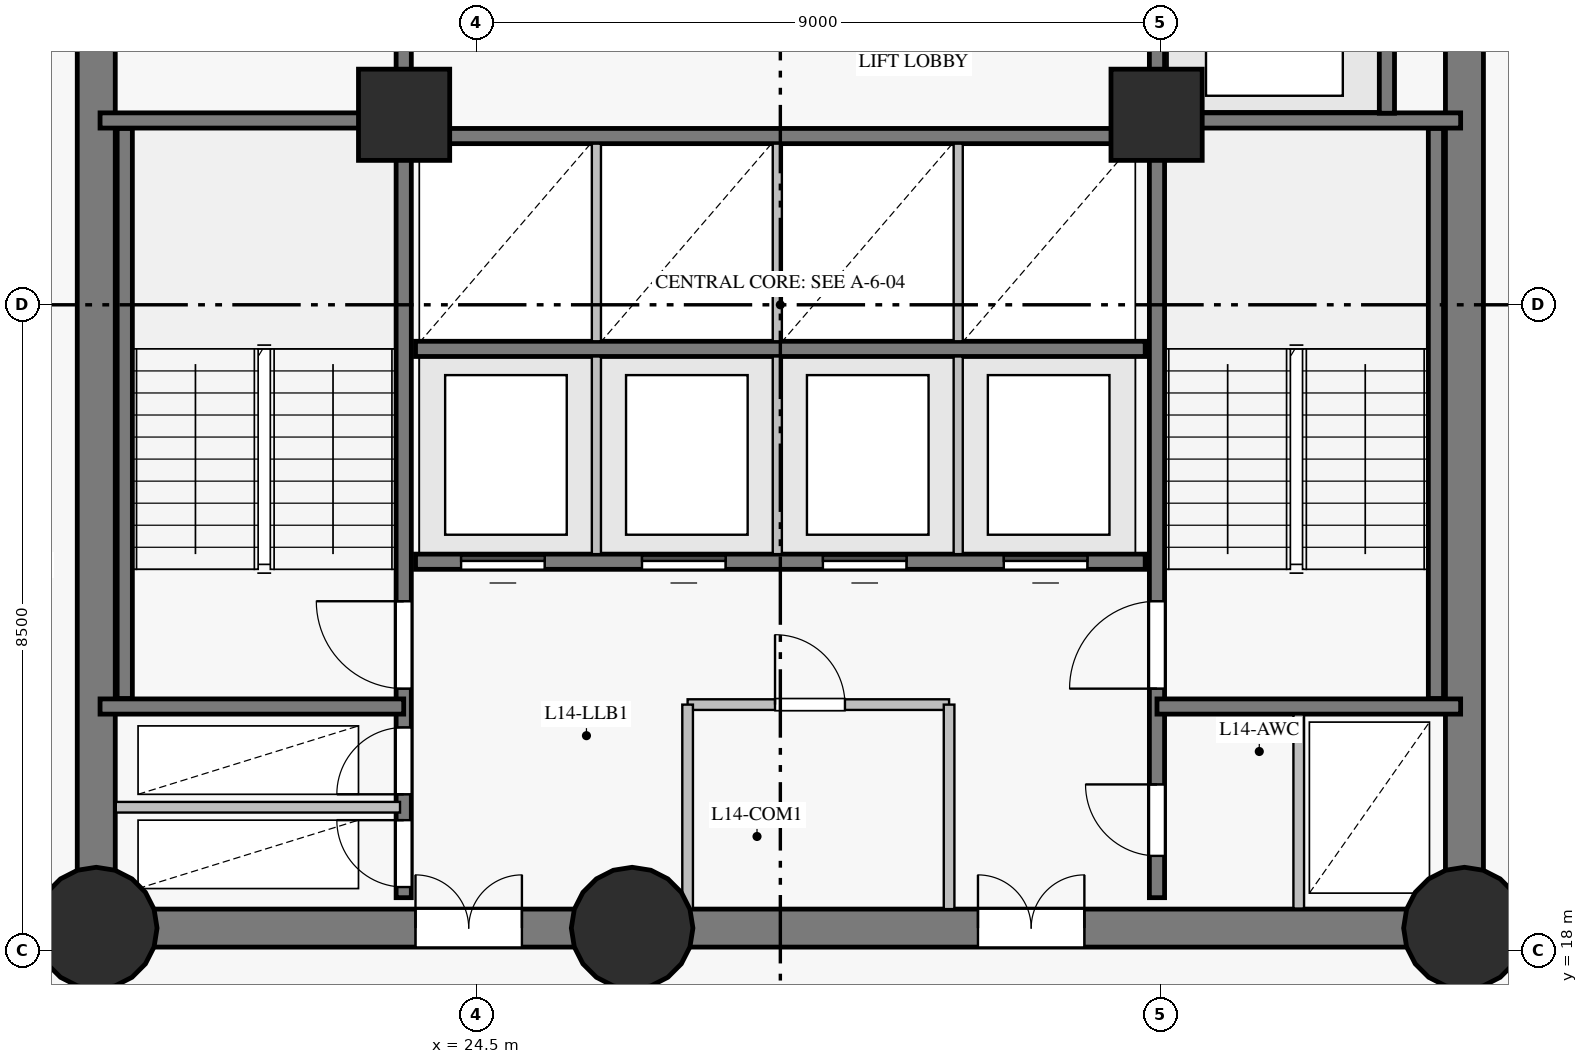
"""IFC4 building model, lengths in metres.
Left out: names, types, materials, properties, quantities, classifications, styles, units other than length and angle.
Written with IfcOpenShell. Run it as: python <this file> out.ifc"""

import sys

from ifc_helpers import new_model, si_unit, direction, frame, frame_2d, origin, origin_with_axes, origin_2d, place, context, subcontext, project, spatial, rectangle, circle, extrude, source, transform, mapped, element, fill, save


model = new_model("IFC4")
c1 = context("Model", 3, precision=1e-05, world=origin(), true_north=direction((0.0, 1.0)))
c2 = subcontext(c1, "Body", "Model", "MODEL_VIEW")
j1 = project(units=[si_unit("LENGTHUNIT", "METRE"), si_unit("PLANEANGLEUNIT", "RADIAN")], contexts=[c1])
p1 = place(None, origin())
s1 = spatial("IfcSite", under=j1, at=p1, CompositionType="ELEMENT")
p2 = place(p1, origin())
s2 = spatial("IfcBuilding", under=s1, at=p2, CompositionType="ELEMENT")
p3 = place(p2, frame((0.0, 0.0, 55.3)))
s3 = spatial("IfcBuildingStorey", under=s2, at=p3, CompositionType="ELEMENT", Elevation=55.3)
p4 = place(p3, frame((19.5, 18.3, 0.0), z_axis=(0.0, 0.0, 1.0), x_axis=(1.0, 0.0, 0.0)))
e1 = element("IfcWall", 1, at=p4, inside=s3, PredefinedType="SHEAR", context=c2, shape_type="SweptSolid", body=[
    extrude(rectangle(XDim=7.05, YDim=0.5, at=frame_2d((3.525, 0.0))), origin(), (0.0, 0.0, 1.0), 3.35),
])
p5 = place(p4, frame((4.2, 0.0, 0.0)))
e2 = element("IfcOpeningElement", 2, at=p5, cuts=e1, PredefinedType="OPENING", context=c2, shape_type="SweptSolid", body=[
    extrude(rectangle(XDim=1.4, YDim=2.2, at=frame_2d((0.7, 1.1))), frame((0.0, 0.26, 0.0), z_axis=(0.0, -1.0, 0.0), x_axis=(1.0, 0.0, 0.0)), (0.0, 0.0, 1.0), 0.52),
])
p6 = place(p3, frame((26.55, 18.3, 0.0), z_axis=(0.0, 0.0, 1.0), x_axis=(1.0, 0.0, 0.0)))
e3 = element("IfcWall", 3, at=p6, inside=s3, PredefinedType="SHEAR", context=c2, shape_type="SweptSolid", body=[
    extrude(rectangle(XDim=10.95, YDim=0.5, at=frame_2d((5.475, 0.0))), origin(), (0.0, 0.0, 1.0), 3.35),
])
p7 = place(p6, frame((4.55, 0.0, 0.0)))
e4 = element("IfcOpeningElement", 4, at=p7, cuts=e3, PredefinedType="OPENING", context=c2, shape_type="SweptSolid", body=[
    extrude(rectangle(XDim=1.4, YDim=2.2, at=frame_2d((0.7, 1.1))), frame((0.0, 0.26, 0.0), z_axis=(0.0, -1.0, 0.0), x_axis=(1.0, 0.0, 0.0)), (0.0, 0.0, 1.0), 0.52),
])
p8 = place(p3, frame((37.5, 18.3, 0.0), z_axis=(0.0, 0.0, 1.0), x_axis=(0.0, 1.0, 0.0)))
e5 = element("IfcWall", 5, at=p8, inside=s3, PredefinedType="SHEAR", context=c2, shape_type="SweptSolid", body=[
    extrude(rectangle(XDim=16.4, YDim=0.5, at=frame_2d((8.2, 0.0))), origin(), (0.0, 0.0, 1.0), 3.35),
])
p9 = place(p8, frame((14.06, 0.0, 0.0)))
e6 = element("IfcOpeningElement", 6, at=p9, cuts=e5, PredefinedType="OPENING", context=c2, shape_type="SweptSolid", body=[
    extrude(rectangle(XDim=1.2, YDim=2.15, at=frame_2d((0.6, 1.075))), frame((0.0, 0.26, 0.0), z_axis=(0.0, -1.0, 0.0), x_axis=(1.0, 0.0, 0.0)), (0.0, 0.0, 1.0), 0.52),
])
p10 = place(p3, frame((19.5, 34.7, 0.0), z_axis=(0.0, 0.0, 1.0), x_axis=(0.0, -1.0, 0.0)))
e7 = element("IfcWall", 7, at=p10, inside=s3, PredefinedType="SHEAR", context=c2, shape_type="SweptSolid", body=[
    extrude(rectangle(XDim=16.4, YDim=0.5, at=frame_2d((8.2, 0.0))), origin(), (0.0, 0.0, 1.0), 3.35),
])
p11 = place(p10, frame((3.1, 0.0, 0.0)))
e8 = element("IfcOpeningElement", 8, at=p11, cuts=e7, PredefinedType="OPENING", context=c2, shape_type="SweptSolid", body=[
    extrude(rectangle(XDim=1.1, YDim=2.15, at=frame_2d((0.55, 1.075))), frame((0.0, 0.26, 0.0), z_axis=(0.0, -1.0, 0.0), x_axis=(1.0, 0.0, 0.0)), (0.0, 0.0, 1.0), 0.52),
])
m1 = source(origin_with_axes(), c2, "Body", "SweptSolid", [
    extrude(circle(Radius=0.8, at=origin_2d()), origin(), (0.0, 0.0, 1.0), 3.6),
])
for number, where, z_axis, x_axis in (
    (9, (19.5, 18.3, 0.0), (0.0, 0.0, 1.0), (1.0, 0.0, 0.0)),
    (10, (26.55, 18.3, 0.0), (0.0, 0.0, 1.0), (1.0, 0.0, 0.0)),
    (11, (37.5, 18.3, 0.0), (0.0, 0.0, 1.0), (1.0, 0.0, 0.0)),
):
    element("IfcColumn", number, at=place(p3, frame(where, z_axis=z_axis, x_axis=x_axis)), inside=s3, PredefinedType="COLUMN", context=c2, shape_type="MappedRepresentation", body=[
        mapped(m1, transform((0.0, 0.0, 0.0), scale=1.0)),
    ])
m2 = source(origin_with_axes(), c2, "Body", "SweptSolid", [
    extrude(rectangle(XDim=1.2, YDim=1.2, at=origin_2d()), origin(), (0.0, 0.0, 1.0), 3.6),
])
for number, where, z_axis, x_axis in (
    (12, (23.55, 29.0, 0.0), (0.0, 0.0, 1.0), (1.0, 0.0, 0.0)),
    (13, (33.45, 29.0, 0.0), (0.0, 0.0, 1.0), (1.0, 0.0, 0.0)),
):
    element("IfcColumn", number, at=place(p3, frame(where, z_axis=z_axis, x_axis=x_axis)), inside=s3, PredefinedType="COLUMN", context=c2, shape_type="MappedRepresentation", body=[
        mapped(m2, transform((0.0, 0.0, 0.0), scale=1.0)),
    ])
p12 = place(p3, frame((23.545, 18.7, 0.0), z_axis=(0.0, 0.0, 1.0), x_axis=(0.0, 1.0, 0.0)))
e14 = element("IfcWall", 14, at=p12, inside=s3, PredefinedType="SHEAR", context=c2, shape_type="SweptSolid", body=[
    extrude(rectangle(XDim=15.6, YDim=0.2, at=frame_2d((7.8, 0.0))), origin(), (0.0, 0.0, 1.0), 3.35),
])
p13 = place(p12, frame((2.75, 0.0, 0.0)))
e15 = element("IfcOpeningElement", 15, at=p13, cuts=e14, PredefinedType="OPENING", context=c2, shape_type="SweptSolid", body=[
    extrude(rectangle(XDim=1.15, YDim=2.15, at=frame_2d((0.575, 1.075))), frame((0.0, 0.11, 0.0), z_axis=(0.0, -1.0, 0.0), x_axis=(1.0, 0.0, 0.0)), (0.0, 0.0, 1.0), 0.22),
])
p14 = place(p12, frame((0.14, 0.0, 0.0)))
e16 = element("IfcOpeningElement", 16, at=p14, cuts=e14, PredefinedType="OPENING", context=c2, shape_type="SweptSolid", body=[
    extrude(rectangle(XDim=0.88, YDim=2.1, at=frame_2d((0.44, 1.05))), frame((0.0, 0.11, 0.0), z_axis=(0.0, -1.0, 0.0), x_axis=(1.0, 0.0, 0.0)), (0.0, 0.0, 1.0), 0.22),
])
p15 = place(p12, frame((1.36, 0.0, 0.0)))
e17 = element("IfcOpeningElement", 17, at=p15, cuts=e14, PredefinedType="OPENING", context=c2, shape_type="SweptSolid", body=[
    extrude(rectangle(XDim=0.88, YDim=2.1, at=frame_2d((0.44, 1.05))), frame((0.0, 0.11, 0.0), z_axis=(0.0, -1.0, 0.0), x_axis=(1.0, 0.0, 0.0)), (0.0, 0.0, 1.0), 0.22),
])
p16 = place(p12, frame((12.1, 0.0, 0.0)))
e18 = element("IfcOpeningElement", 18, at=p16, cuts=e14, PredefinedType="OPENING", context=c2, shape_type="SweptSolid", body=[
    extrude(rectangle(XDim=1.12, YDim=2.15, at=frame_2d((0.56, 1.075))), frame((0.0, 0.11, 0.0), z_axis=(0.0, -1.0, 0.0), x_axis=(1.0, 0.0, 0.0)), (0.0, 0.0, 1.0), 0.22),
])
p17 = place(p12, frame((14.05, 0.0, 0.0)))
e19 = element("IfcOpeningElement", 19, at=p17, cuts=e14, PredefinedType="OPENING", context=c2, shape_type="SweptSolid", body=[
    extrude(rectangle(XDim=1.12, YDim=2.15, at=frame_2d((0.56, 1.075))), frame((0.0, 0.11, 0.0), z_axis=(0.0, -1.0, 0.0), x_axis=(1.0, 0.0, 0.0)), (0.0, 0.0, 1.0), 0.22),
])
p18 = place(p3, frame((33.455, 18.7, 0.0), z_axis=(0.0, 0.0, 1.0), x_axis=(0.0, 1.0, 0.0)))
e20 = element("IfcWall", 20, at=p18, inside=s3, PredefinedType="SHEAR", context=c2, shape_type="SweptSolid", body=[
    extrude(rectangle(XDim=15.6, YDim=0.2, at=frame_2d((7.8, 0.0))), origin(), (0.0, 0.0, 1.0), 3.35),
])
p19 = place(p18, frame((2.75, 0.0, 0.0)))
e21 = element("IfcOpeningElement", 21, at=p19, cuts=e20, PredefinedType="OPENING", context=c2, shape_type="SweptSolid", body=[
    extrude(rectangle(XDim=1.15, YDim=2.15, at=frame_2d((0.575, 1.075))), frame((0.0, 0.11, 0.0), z_axis=(0.0, -1.0, 0.0), x_axis=(1.0, 0.0, 0.0)), (0.0, 0.0, 1.0), 0.22),
])
p20 = place(p18, frame((0.55, 0.0, 0.0)))
e22 = element("IfcOpeningElement", 22, at=p20, cuts=e20, PredefinedType="OPENING", context=c2, shape_type="SweptSolid", body=[
    extrude(rectangle(XDim=0.94, YDim=2.1, at=frame_2d((0.47, 1.05))), frame((0.0, 0.11, 0.0), z_axis=(0.0, -1.0, 0.0), x_axis=(1.0, 0.0, 0.0)), (0.0, 0.0, 1.0), 0.22),
])
p21 = place(p3, frame((23.7, 23.12, 0.0), z_axis=(0.0, 0.0, 1.0), x_axis=(1.0, 0.0, 0.0)))
e23 = element("IfcWall", 23, at=p21, inside=s3, PredefinedType="SHEAR", context=c2, shape_type="SweptSolid", body=[
    extrude(rectangle(XDim=9.6, YDim=0.2, at=frame_2d((4.8, 0.0))), origin(), (0.0, 0.0, 1.0), 3.35),
])
p22 = place(p21, frame((0.6, 0.0, 0.0)))
e24 = element("IfcOpeningElement", 24, at=p22, cuts=e23, PredefinedType="OPENING", context=c2, shape_type="SweptSolid", body=[
    extrude(rectangle(XDim=1.1, YDim=2.15, at=frame_2d((0.55, 1.075))), frame((0.0, 0.11, 0.0), z_axis=(0.0, -1.0, 0.0), x_axis=(1.0, 0.0, 0.0)), (0.0, 0.0, 1.0), 0.22),
])
p23 = place(p21, frame((2.98, 0.0, 0.0)))
e25 = element("IfcOpeningElement", 25, at=p23, cuts=e23, PredefinedType="OPENING", context=c2, shape_type="SweptSolid", body=[
    extrude(rectangle(XDim=1.1, YDim=2.15, at=frame_2d((0.55, 1.075))), frame((0.0, 0.11, 0.0), z_axis=(0.0, -1.0, 0.0), x_axis=(1.0, 0.0, 0.0)), (0.0, 0.0, 1.0), 0.22),
])
p24 = place(p21, frame((5.36, 0.0, 0.0)))
e26 = element("IfcOpeningElement", 26, at=p24, cuts=e23, PredefinedType="OPENING", context=c2, shape_type="SweptSolid", body=[
    extrude(rectangle(XDim=1.1, YDim=2.15, at=frame_2d((0.55, 1.075))), frame((0.0, 0.11, 0.0), z_axis=(0.0, -1.0, 0.0), x_axis=(1.0, 0.0, 0.0)), (0.0, 0.0, 1.0), 0.22),
])
p25 = place(p21, frame((7.74, 0.0, 0.0)))
e27 = element("IfcOpeningElement", 27, at=p25, cuts=e23, PredefinedType="OPENING", context=c2, shape_type="SweptSolid", body=[
    extrude(rectangle(XDim=1.1, YDim=2.15, at=frame_2d((0.55, 1.075))), frame((0.0, 0.11, 0.0), z_axis=(0.0, -1.0, 0.0), x_axis=(1.0, 0.0, 0.0)), (0.0, 0.0, 1.0), 0.22),
])
for number, where, z_axis, x_axis in (
    (28, (23.7, 25.92, 0.0), (0.0, 0.0, 1.0), (1.0, 0.0, 0.0)),
    (29, (23.7, 28.72, 0.0), (0.0, 0.0, 1.0), (1.0, 0.0, 0.0)),
):
    element("IfcWall", number, at=place(p3, frame(where, z_axis=z_axis, x_axis=x_axis)), inside=s3, PredefinedType="SHEAR", context=c2, shape_type="SweptSolid", body=[
        extrude(rectangle(XDim=9.6, YDim=0.2, at=frame_2d((4.8, 0.0))), origin(), (0.0, 0.0, 1.0), 3.35),
    ])
for number, where, z_axis, x_axis in (
    (30, (19.875, 21.32, 0.0), (0.0, 0.0, 1.0), (0.0, 1.0, 0.0)),
    (31, (37.125, 21.32, 0.0), (0.0, 0.0, 1.0), (0.0, 1.0, 0.0)),
):
    element("IfcWall", number, at=place(p3, frame(where, z_axis=z_axis, x_axis=x_axis)), inside=s3, PredefinedType="SHEAR", context=c2, shape_type="SweptSolid", body=[
        extrude(rectangle(XDim=7.5, YDim=0.2, at=frame_2d((3.75, 0.0))), origin(), (0.0, 0.0, 1.0), 3.35),
    ])
for number, where, z_axis, x_axis in (
    (32, (33.455, 21.215, 0.0), (0.0, 0.0, 1.0), (1.0, 0.0, 0.0)),
    (33, (33.455, 28.925, 0.0), (0.0, 0.0, 1.0), (1.0, 0.0, 0.0)),
    (34, (19.55, 21.215, 0.0), (0.0, 0.0, 1.0), (1.0, 0.0, 0.0)),
    (35, (19.55, 28.925, 0.0), (0.0, 0.0, 1.0), (1.0, 0.0, 0.0)),
):
    element("IfcWall", number, at=place(p3, frame(where, z_axis=z_axis, x_axis=x_axis)), inside=s3, PredefinedType="SHEAR", context=c2, shape_type="SweptSolid", body=[
        extrude(rectangle(XDim=3.995, YDim=0.2, at=frame_2d((1.998, 0.0))), origin(), (0.0, 0.0, 1.0), 3.35),
    ])
p26 = place(p3, frame((36.48, 29.02, 0.0), z_axis=(0.0, 0.0, 1.0), x_axis=(0.0, 1.0, 0.0)))
e36 = element("IfcWall", 36, at=p26, inside=s3, PredefinedType="SHEAR", context=c2, shape_type="SweptSolid", body=[
    extrude(rectangle(XDim=2.86, YDim=0.2, at=frame_2d((1.43, 0.0))), origin(), (0.0, 0.0, 1.0), 3.35),
])
p27 = place(p3, frame((19.757, 19.89, 0.0), z_axis=(0.0, 0.0, 1.0), x_axis=(1.0, 0.0, 0.0)))
e37 = element("IfcWall", 37, at=p27, inside=s3, PredefinedType="PARTITIONING", context=c2, shape_type="SweptSolid", body=[
    extrude(rectangle(XDim=3.739, YDim=0.14, at=frame_2d((1.87, 0.0))), origin(), (0.0, 0.0, 1.0), 3.35),
])
p28 = place(p3, frame((27.28, 21.24, 0.0), z_axis=(0.0, 0.0, 1.0), x_axis=(1.0, 0.0, 0.0)))
e38 = element("IfcWall", 38, at=p28, inside=s3, PredefinedType="PARTITIONING", context=c2, shape_type="SweptSolid", body=[
    extrude(rectangle(XDim=3.44, YDim=0.14, at=frame_2d((1.72, 0.0))), origin(), (0.0, 0.0, 1.0), 3.35),
])
p29 = place(p28, frame((1.15, 0.0, 0.0)))
e39 = element("IfcOpeningElement", 39, at=p29, cuts=e38, PredefinedType="OPENING", context=c2, shape_type="SweptSolid", body=[
    extrude(rectangle(XDim=0.92, YDim=2.1, at=frame_2d((0.46, 1.05))), frame((0.0, 0.08, 0.0), z_axis=(0.0, -1.0, 0.0), x_axis=(1.0, 0.0, 0.0)), (0.0, 0.0, 1.0), 0.16),
])
for number, where, z_axis, x_axis in (
    (40, (27.28, 18.55, 0.0), (0.0, 0.0, 1.0), (0.0, 1.0, 0.0)),
    (41, (30.72, 18.55, 0.0), (0.0, 0.0, 1.0), (0.0, 1.0, 0.0)),
):
    element("IfcWall", number, at=place(p3, frame(where, z_axis=z_axis, x_axis=x_axis)), inside=s3, PredefinedType="PARTITIONING", context=c2, shape_type="SweptSolid", body=[
        extrude(rectangle(XDim=2.69, YDim=0.14, at=frame_2d((1.345, 0.0))), origin(), (0.0, 0.0, 1.0), 3.35),
    ])
for number, where, z_axis, x_axis in (
    (42, (26.08, 23.22, 0.0), (0.0, 0.0, 1.0), (0.0, 1.0, 0.0)),
    (43, (28.46, 23.22, 0.0), (0.0, 0.0, 1.0), (0.0, 1.0, 0.0)),
    (44, (30.84, 23.22, 0.0), (0.0, 0.0, 1.0), (0.0, 1.0, 0.0)),
    (45, (26.08, 26.02, 0.0), (0.0, 0.0, 1.0), (0.0, 1.0, 0.0)),
    (46, (28.46, 26.02, 0.0), (0.0, 0.0, 1.0), (0.0, 1.0, 0.0)),
    (47, (30.84, 26.02, 0.0), (0.0, 0.0, 1.0), (0.0, 1.0, 0.0)),
):
    element("IfcWall", number, at=place(p3, frame(where, z_axis=z_axis, x_axis=x_axis)), inside=s3, PredefinedType="PARTITIONING", context=c2, shape_type="SweptSolid", body=[
        extrude(rectangle(XDim=2.6, YDim=0.12, at=frame_2d((1.3, 0.0))), origin(), (0.0, 0.0, 1.0), 3.35),
    ])
p30 = place(p3, frame((35.32, 18.557, 0.0), z_axis=(0.0, 0.0, 1.0), x_axis=(0.0, 1.0, 0.0)))
e48 = element("IfcWall", 48, at=p30, inside=s3, PredefinedType="PARTITIONING", context=c2, shape_type="SweptSolid", body=[
    extrude(rectangle(XDim=2.553, YDim=0.14, at=frame_2d((1.277, 0.0))), origin(), (0.0, 0.0, 1.0), 3.35),
])
m3 = source(origin_with_axes(), c2, "Body", "SweptSolid", [
    extrude(rectangle(XDim=1.15, YDim=2.15, at=frame_2d((0.575, 1.075))), frame((0.0, 0.025, 0.0), z_axis=(0.0, -1.0, 0.0), x_axis=(1.0, 0.0, 0.0)), (0.0, 0.0, 1.0), 0.05),
])
p31 = place(p13, origin())
e49 = element("IfcDoor", 49, at=p31, inside=s3, OperationType="SINGLE_SWING_RIGHT", PredefinedType="DOOR", context=c2, shape_type="MappedRepresentation", body=[
    mapped(m3, transform((0.0, 0.0, 0.0), scale=1.0)),
])
fill(e15, e49)
p32 = place(p19, origin())
e50 = element("IfcDoor", 50, at=p32, inside=s3, OperationType="SINGLE_SWING_LEFT", PredefinedType="DOOR", context=c2, shape_type="MappedRepresentation", body=[
    mapped(m3, transform((0.0, 0.0, 0.0), scale=1.0)),
])
fill(e21, e50)
m4 = source(origin_with_axes(), c2, "Body", "SweptSolid", [
    extrude(rectangle(XDim=0.88, YDim=2.1, at=frame_2d((0.44, 1.05))), frame((0.0, 0.025, 0.0), z_axis=(0.0, -1.0, 0.0), x_axis=(1.0, 0.0, 0.0)), (0.0, 0.0, 1.0), 0.05),
])
p33 = place(p14, origin())
e51 = element("IfcDoor", 51, at=p33, inside=s3, OperationType="SINGLE_SWING_RIGHT", PredefinedType="DOOR", context=c2, shape_type="MappedRepresentation", body=[
    mapped(m4, transform((0.0, 0.0, 0.0), scale=1.0)),
])
fill(e16, e51)
p34 = place(p15, origin())
e52 = element("IfcDoor", 52, at=p34, inside=s3, OperationType="SINGLE_SWING_LEFT", PredefinedType="DOOR", context=c2, shape_type="MappedRepresentation", body=[
    mapped(m4, transform((0.0, 0.0, 0.0), scale=1.0)),
])
fill(e17, e52)
m5 = source(origin_with_axes(), c2, "Body", "SweptSolid", [
    extrude(rectangle(XDim=1.4, YDim=2.2, at=frame_2d((0.7, 1.1))), frame((0.0, 0.025, 0.0), z_axis=(0.0, -1.0, 0.0), x_axis=(1.0, 0.0, 0.0)), (0.0, 0.0, 1.0), 0.05),
])
p35 = place(p5, origin())
e53 = element("IfcDoor", 53, at=p35, inside=s3, OperationType="DOUBLE_DOOR_SINGLE_SWING", PredefinedType="DOOR", context=c2, shape_type="MappedRepresentation", body=[
    mapped(m5, transform((0.0, 0.0, 0.0), scale=1.0)),
])
fill(e2, e53)
p36 = place(p7, origin())
e54 = element("IfcDoor", 54, at=p36, inside=s3, OperationType="DOUBLE_DOOR_SINGLE_SWING", PredefinedType="DOOR", context=c2, shape_type="MappedRepresentation", body=[
    mapped(m5, transform((0.0, 0.0, 0.0), scale=1.0)),
])
fill(e4, e54)
m6 = source(origin_with_axes(), c2, "Body", "SweptSolid", [
    extrude(rectangle(XDim=0.94, YDim=2.1, at=frame_2d((0.47, 1.05))), frame((0.0, 0.025, 0.0), z_axis=(0.0, -1.0, 0.0), x_axis=(1.0, 0.0, 0.0)), (0.0, 0.0, 1.0), 0.05),
])
p37 = place(p20, origin())
e55 = element("IfcDoor", 55, at=p37, inside=s3, OperationType="SINGLE_SWING_RIGHT", PredefinedType="DOOR", context=c2, shape_type="MappedRepresentation", body=[
    mapped(m6, transform((0.0, 0.0, 0.0), scale=1.0)),
])
fill(e22, e55)
m7 = source(origin_with_axes(), c2, "Body", "SweptSolid", [
    extrude(rectangle(XDim=0.92, YDim=2.1, at=frame_2d((0.46, 1.05))), frame((0.0, 0.025, 0.0), z_axis=(0.0, -1.0, 0.0), x_axis=(1.0, 0.0, 0.0)), (0.0, 0.0, 1.0), 0.05),
])
p38 = place(p29, origin())
e56 = element("IfcDoor", 56, at=p38, inside=s3, OperationType="SINGLE_SWING_LEFT", PredefinedType="DOOR", context=c2, shape_type="MappedRepresentation", body=[
    mapped(m7, transform((0.0, 0.0, 0.0), scale=1.0)),
])
fill(e39, e56)
m8 = source(origin_with_axes(), c2, "Body", "SweptSolid", [
    extrude(rectangle(XDim=1.1, YDim=2.15, at=frame_2d((0.55, 1.075))), frame((0.0, 0.025, 0.0), z_axis=(0.0, -1.0, 0.0), x_axis=(1.0, 0.0, 0.0)), (0.0, 0.0, 1.0), 0.05),
])
p39 = place(p22, origin())
e57 = element("IfcDoor", 57, at=p39, inside=s3, OperationType="SLIDING_TO_LEFT", PredefinedType="DOOR", context=c2, shape_type="MappedRepresentation", body=[
    mapped(m8, transform((0.0, 0.0, 0.0), scale=1.0)),
])
fill(e24, e57)
p40 = place(p23, origin())
e58 = element("IfcDoor", 58, at=p40, inside=s3, OperationType="SLIDING_TO_RIGHT", PredefinedType="DOOR", context=c2, shape_type="MappedRepresentation", body=[
    mapped(m8, transform((0.0, 0.0, 0.0), scale=1.0)),
])
fill(e25, e58)
p41 = place(p24, origin())
e59 = element("IfcDoor", 59, at=p41, inside=s3, OperationType="SLIDING_TO_LEFT", PredefinedType="DOOR", context=c2, shape_type="MappedRepresentation", body=[
    mapped(m8, transform((0.0, 0.0, 0.0), scale=1.0)),
])
fill(e26, e59)
p42 = place(p25, origin())
e60 = element("IfcDoor", 60, at=p42, inside=s3, OperationType="SLIDING_TO_RIGHT", PredefinedType="DOOR", context=c2, shape_type="MappedRepresentation", body=[
    mapped(m8, transform((0.0, 0.0, 0.0), scale=1.0)),
])
fill(e27, e60)
save(model, sys.argv[1])
